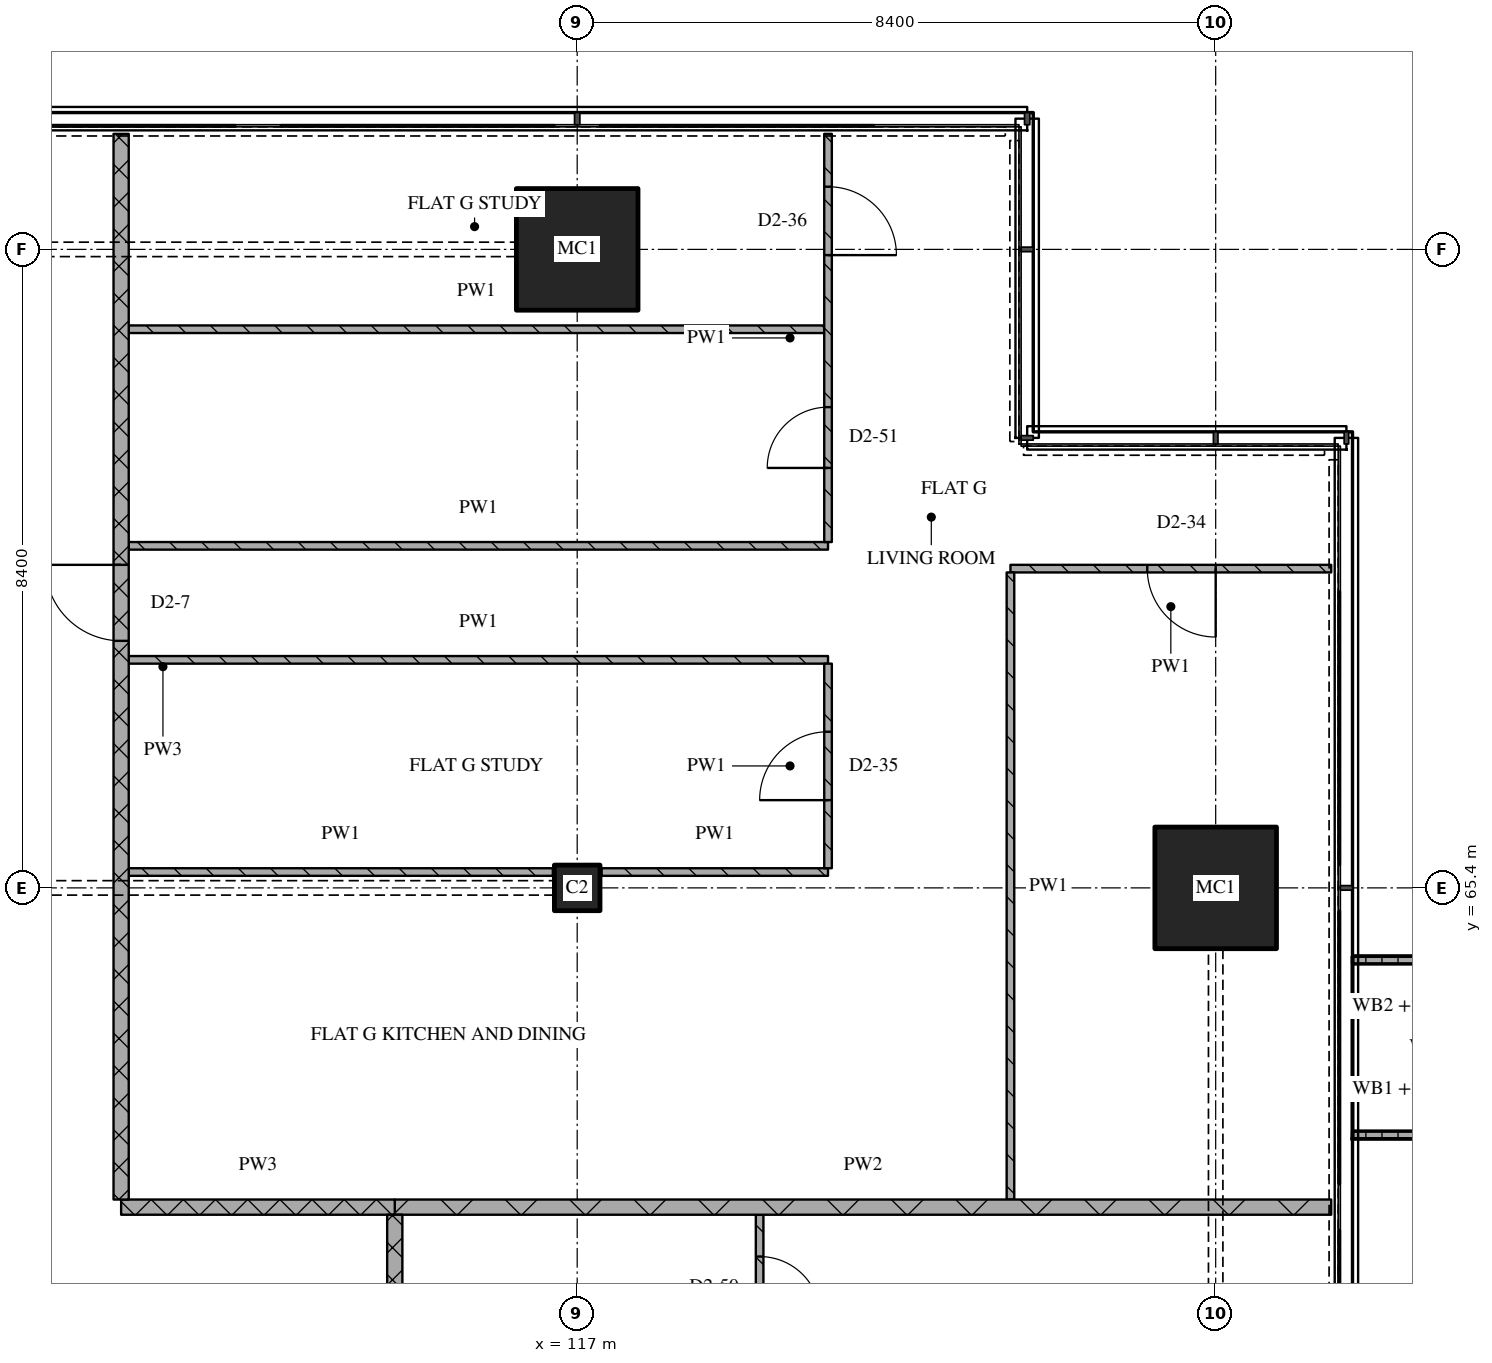
"""IFC4 building model, lengths in metres.
Left out: names, types, materials, properties, quantities, classifications, styles, units other than length and angle.
Written with IfcOpenShell. Run it as: python <this file> out.ifc"""

import sys

from ifc_helpers import new_model, si_unit, direction, frame, frame_2d, origin, origin_2d, place, context, subcontext, project, spatial, polyline, rectangle, outline, extrude, element, fill, save


model = new_model("IFC4")
c1 = context("Model", 3, precision=1e-05, world=origin(), true_north=direction((0.0, 1.0)))
c2 = subcontext(c1, "Body", "Model", "MODEL_VIEW")
j1 = project(units=[si_unit("LENGTHUNIT", "METRE"), si_unit("PLANEANGLEUNIT", "RADIAN")], contexts=[c1])
p1 = place(None, origin())
s1 = spatial("IfcSite", under=j1, at=p1, CompositionType="ELEMENT")
p2 = place(p1, origin())
s2 = spatial("IfcBuilding", under=s1, at=p2, CompositionType="ELEMENT")
p3 = place(p2, frame((0.0, 0.0, 216.3)))
s3 = spatial("IfcBuildingStorey", under=s2, at=p3, CompositionType="ELEMENT", Elevation=216.3)
p4 = place(p3, frame((117.0, 65.4, 0.0), z_axis=(0.0, 0.0, 1.0), x_axis=(1.0, 0.0, 0.0)))
e1 = element("IfcColumn", 1, at=p4, inside=s3, PredefinedType="COLUMN", context=c2, shape_type="SweptSolid", body=[
    extrude(rectangle(XDim=0.6, YDim=0.6, at=origin_2d()), origin(), (0.0, 0.0, 1.0), 3.6),
])
for number, where, z_axis, x_axis in (
    (2, (117.0, 73.8, 0.0), (0.0, 0.0, 1.0), (1.0, 0.0, 0.0)),
    (3, (125.4, 65.4, 0.0), (0.0, 0.0, 1.0), (1.0, 0.0, 0.0)),
):
    element("IfcColumn", number, at=place(p3, frame(where, z_axis=z_axis, x_axis=x_axis)), inside=s3, PredefinedType="COLUMN", context=c2, shape_type="SweptSolid", body=[
        extrude(rectangle(XDim=1.6, YDim=1.6, at=origin_2d()), origin(), (0.0, 0.0, 1.0), 3.6),
    ])
p5 = place(p3, origin())
e4 = element("IfcWall", 4, at=p5, inside=s3, PredefinedType="SOLIDWALL", context=c2, shape_type="SweptSolid", body=[
    extrude(outline(polyline([(127.2, 62.1), (127.2, 62.2), (128.7, 62.2), (128.7, 64.4), (127.2, 64.4), (127.2, 64.5), (128.8, 64.5), (128.8, 62.1), (127.2, 62.1)])), origin(), (0.0, 0.0, 1.0), 1.0),
])
p6 = place(p3, frame((111.0, 61.2, 0.0), z_axis=(0.0, 0.0, 1.0), x_axis=(1.0, 0.0, 0.0)))
e5 = element("IfcWall", 5, at=p6, inside=s3, PredefinedType="PARTITIONING", context=c2, shape_type="SweptSolid", body=[
    extrude(rectangle(XDim=3.6, YDim=0.2, at=frame_2d((1.8, 0.0))), origin(), (0.0, 0.0, 1.0), 3.32),
])
p7 = place(p3, frame((114.6, 61.2, 0.0), z_axis=(0.0, 0.0, 1.0), x_axis=(1.0, 0.0, 0.0)))
e6 = element("IfcWall", 6, at=p7, inside=s3, PredefinedType="PARTITIONING", context=c2, shape_type="SweptSolid", body=[
    extrude(rectangle(XDim=12.32, YDim=0.2, at=frame_2d((6.16, 0.0))), origin(), (0.0, 0.0, 1.0), 3.32),
])
p8 = place(p3, frame((111.1, 65.609, 0.0), z_axis=(0.0, 0.0, 1.0), x_axis=(1.0, 0.0, 0.0)))
e7 = element("IfcWall", 7, at=p8, inside=s3, PredefinedType="PARTITIONING", context=c2, shape_type="SweptSolid", body=[
    extrude(rectangle(XDim=5.58, YDim=0.1, at=frame_2d((2.79, 0.0))), origin(), (0.0, 0.0, 1.0), 3.32),
])
p9 = place(p3, frame((117.32, 65.609, 0.0), z_axis=(0.0, 0.0, 1.0), x_axis=(1.0, 0.0, 0.0)))
e8 = element("IfcWall", 8, at=p9, inside=s3, PredefinedType="PARTITIONING", context=c2, shape_type="SweptSolid", body=[
    extrude(rectangle(XDim=2.98, YDim=0.1, at=frame_2d((1.49, 0.0))), origin(), (0.0, 0.0, 1.0), 3.32),
])
p10 = place(p3, frame((111.1, 68.4, 0.0), z_axis=(0.0, 0.0, 1.0), x_axis=(1.0, 0.0, 0.0)))
e9 = element("IfcWall", 9, at=p10, inside=s3, PredefinedType="PARTITIONING", context=c2, shape_type="SweptSolid", body=[
    extrude(rectangle(XDim=9.2, YDim=0.1, at=frame_2d((4.6, 0.0))), origin(), (0.0, 0.0, 1.0), 3.32),
])
p11 = place(p3, frame((126.92, 69.6, 0.0), z_axis=(0.0, 0.0, 1.0), x_axis=(-1.0, 0.0, 0.0)))
e10 = element("IfcWall", 10, at=p11, inside=s3, PredefinedType="PARTITIONING", context=c2, shape_type="SweptSolid", body=[
    extrude(rectangle(XDim=4.22, YDim=0.1, at=frame_2d((2.11, 0.0))), origin(), (0.0, 0.0, 1.0), 3.32),
])
p12 = place(p11, frame((1.52, 0.0, 0.0)))
e11 = element("IfcOpeningElement", 11, at=p12, cuts=e10, PredefinedType="OPENING", context=c2, shape_type="SweptSolid", body=[
    extrude(rectangle(XDim=0.9, YDim=2.1, at=frame_2d((0.45, 1.05))), frame((0.0, 0.06, 0.0), z_axis=(0.0, -1.0, 0.0), x_axis=(1.0, 0.0, 0.0)), (0.0, 0.0, 1.0), 0.12),
])
p13 = place(p3, frame((111.1, 69.9, 0.0), z_axis=(0.0, 0.0, 1.0), x_axis=(1.0, 0.0, 0.0)))
e12 = element("IfcWall", 12, at=p13, inside=s3, PredefinedType="PARTITIONING", context=c2, shape_type="SweptSolid", body=[
    extrude(rectangle(XDim=9.2, YDim=0.1, at=frame_2d((4.6, 0.0))), origin(), (0.0, 0.0, 1.0), 3.32),
])
p14 = place(p3, frame((111.1, 72.75, 0.0), z_axis=(0.0, 0.0, 1.0), x_axis=(1.0, 0.0, 0.0)))
e13 = element("IfcWall", 13, at=p14, inside=s3, PredefinedType="PARTITIONING", context=c2, shape_type="SweptSolid", body=[
    extrude(rectangle(XDim=9.15, YDim=0.1, at=frame_2d((4.575, 0.0))), origin(), (0.0, 0.0, 1.0), 3.32),
])
p15 = place(p3, frame((111.0, 75.32, 0.0), z_axis=(0.0, 0.0, 1.0), x_axis=(0.0, -1.0, 0.0)))
e14 = element("IfcWall", 14, at=p15, inside=s3, PredefinedType="PARTITIONING", context=c2, shape_type="SweptSolid", body=[
    extrude(rectangle(XDim=14.02, YDim=0.2, at=frame_2d((7.01, 0.0))), origin(), (0.0, 0.0, 1.0), 3.32),
])
p16 = place(p15, frame((5.67, 0.0, 0.0)))
e15 = element("IfcOpeningElement", 15, at=p16, cuts=e14, PredefinedType="OPENING", context=c2, shape_type="SweptSolid", body=[
    extrude(rectangle(XDim=1.0, YDim=2.1, at=frame_2d((0.5, 1.05))), frame((0.0, 0.11, 0.0), z_axis=(0.0, -1.0, 0.0), x_axis=(1.0, 0.0, 0.0)), (0.0, 0.0, 1.0), 0.22),
])
p17 = place(p3, frame((114.6, 61.1, 0.0), z_axis=(0.0, 0.0, 1.0), x_axis=(0.0, -1.0, 0.0)))
e16 = element("IfcWall", 16, at=p17, inside=s3, PredefinedType="PARTITIONING", context=c2, shape_type="SweptSolid", body=[
    extrude(rectangle(XDim=17.8, YDim=0.2, at=frame_2d((8.9, 0.0))), origin(), (0.0, 0.0, 1.0), 3.32),
])
p18 = place(p3, frame((119.4, 54.65, 0.0), z_axis=(0.0, 0.0, 1.0), x_axis=(0.0, 1.0, 0.0)))
e17 = element("IfcWall", 17, at=p18, inside=s3, PredefinedType="PARTITIONING", context=c2, shape_type="SweptSolid", body=[
    extrude(rectangle(XDim=6.45, YDim=0.1, at=frame_2d((3.225, 0.0))), origin(), (0.0, 0.0, 1.0), 3.32),
])
p19 = place(p18, frame((1.8, 0.0, 0.0)))
e18 = element("IfcOpeningElement", 18, at=p19, cuts=e17, PredefinedType="OPENING", context=c2, shape_type="SweptSolid", body=[
    extrude(rectangle(XDim=0.8, YDim=2.1, at=frame_2d((0.4, 1.05))), frame((0.0, 0.06, 0.0), z_axis=(0.0, -1.0, 0.0), x_axis=(1.0, 0.0, 0.0)), (0.0, 0.0, 1.0), 0.12),
])
p20 = place(p18, frame((5.1, 0.0, 0.0)))
e19 = element("IfcOpeningElement", 19, at=p20, cuts=e17, PredefinedType="OPENING", context=c2, shape_type="SweptSolid", body=[
    extrude(rectangle(XDim=0.8, YDim=2.1, at=frame_2d((0.4, 1.05))), frame((0.0, 0.06, 0.0), z_axis=(0.0, -1.0, 0.0), x_axis=(1.0, 0.0, 0.0)), (0.0, 0.0, 1.0), 0.12),
])
p21 = place(p3, frame((120.3, 65.659, 0.0), z_axis=(0.0, 0.0, 1.0), x_axis=(0.0, 1.0, 0.0)))
e20 = element("IfcWall", 20, at=p21, inside=s3, PredefinedType="PARTITIONING", context=c2, shape_type="SweptSolid", body=[
    extrude(rectangle(XDim=2.691, YDim=0.1, at=frame_2d((1.346, 0.0))), origin(), (0.0, 0.0, 1.0), 3.32),
])
p22 = place(p21, frame((0.896, 0.0, 0.0)))
e21 = element("IfcOpeningElement", 21, at=p22, cuts=e20, PredefinedType="OPENING", context=c2, shape_type="SweptSolid", body=[
    extrude(rectangle(XDim=0.9, YDim=2.1, at=frame_2d((0.45, 1.05))), frame((0.0, 0.06, 0.0), z_axis=(0.0, -1.0, 0.0), x_axis=(1.0, 0.0, 0.0)), (0.0, 0.0, 1.0), 0.12),
])
p23 = place(p3, frame((120.3, 69.95, 0.0), z_axis=(0.0, 0.0, 1.0), x_axis=(0.0, 1.0, 0.0)))
e22 = element("IfcWall", 22, at=p23, inside=s3, PredefinedType="PARTITIONING", context=c2, shape_type="SweptSolid", body=[
    extrude(rectangle(XDim=5.37, YDim=0.1, at=frame_2d((2.685, 0.0))), origin(), (0.0, 0.0, 1.0), 3.32),
])
p24 = place(p23, frame((0.975, 0.0, 0.0)))
e23 = element("IfcOpeningElement", 23, at=p24, cuts=e22, PredefinedType="OPENING", context=c2, shape_type="SweptSolid", body=[
    extrude(rectangle(XDim=0.8, YDim=2.1, at=frame_2d((0.4, 1.05))), frame((0.0, 0.06, 0.0), z_axis=(0.0, -1.0, 0.0), x_axis=(1.0, 0.0, 0.0)), (0.0, 0.0, 1.0), 0.12),
])
p25 = place(p23, frame((3.775, 0.0, 0.0)))
e24 = element("IfcOpeningElement", 24, at=p25, cuts=e22, PredefinedType="OPENING", context=c2, shape_type="SweptSolid", body=[
    extrude(rectangle(XDim=0.9, YDim=2.1, at=frame_2d((0.45, 1.05))), frame((0.0, 0.06, 0.0), z_axis=(0.0, -1.0, 0.0), x_axis=(1.0, 0.0, 0.0)), (0.0, 0.0, 1.0), 0.12),
])
p26 = place(p3, frame((122.7, 69.55, 0.0), z_axis=(0.0, 0.0, 1.0), x_axis=(0.0, -1.0, 0.0)))
e25 = element("IfcWall", 25, at=p26, inside=s3, PredefinedType="PARTITIONING", context=c2, shape_type="SweptSolid", body=[
    extrude(rectangle(XDim=8.25, YDim=0.1, at=frame_2d((4.125, 0.0))), origin(), (0.0, 0.0, 1.0), 3.32),
])
p27 = place(p12, origin())
e26 = element("IfcDoor", 26, at=p27, inside=s3, OperationType="SINGLE_SWING_LEFT", PredefinedType="DOOR", context=c2, shape_type="SweptSolid", body=[
    extrude(rectangle(XDim=0.9, YDim=2.1, at=frame_2d((0.45, 1.05))), frame((0.0, 0.025, 0.0), z_axis=(0.0, -1.0, 0.0), x_axis=(1.0, 0.0, 0.0)), (0.0, 0.0, 1.0), 0.05),
])
fill(e11, e26)
p28 = place(p16, origin())
e27 = element("IfcDoor", 27, at=p28, inside=s3, OperationType="SINGLE_SWING_RIGHT", PredefinedType="DOOR", context=c2, shape_type="SweptSolid", body=[
    extrude(rectangle(XDim=1.0, YDim=2.1, at=frame_2d((0.5, 1.05))), frame((0.0, 0.025, 0.0), z_axis=(0.0, -1.0, 0.0), x_axis=(1.0, 0.0, 0.0)), (0.0, 0.0, 1.0), 0.05),
])
fill(e15, e27)
p29 = place(p20, origin())
e28 = element("IfcDoor", 28, at=p29, inside=s3, OperationType="SINGLE_SWING_RIGHT", PredefinedType="DOOR", context=c2, shape_type="SweptSolid", body=[
    extrude(rectangle(XDim=0.8, YDim=2.1, at=frame_2d((0.4, 1.05))), frame((0.0, 0.025, 0.0), z_axis=(0.0, -1.0, 0.0), x_axis=(1.0, 0.0, 0.0)), (0.0, 0.0, 1.0), 0.05),
])
fill(e19, e28)
p30 = place(p22, origin())
e29 = element("IfcDoor", 29, at=p30, inside=s3, OperationType="SINGLE_SWING_LEFT", PredefinedType="DOOR", context=c2, shape_type="SweptSolid", body=[
    extrude(rectangle(XDim=0.9, YDim=2.1, at=frame_2d((0.45, 1.05))), frame((0.0, 0.025, 0.0), z_axis=(0.0, -1.0, 0.0), x_axis=(1.0, 0.0, 0.0)), (0.0, 0.0, 1.0), 0.05),
])
fill(e21, e29)
p31 = place(p24, origin())
e30 = element("IfcDoor", 30, at=p31, inside=s3, OperationType="SINGLE_SWING_LEFT", PredefinedType="DOOR", context=c2, shape_type="SweptSolid", body=[
    extrude(rectangle(XDim=0.8, YDim=2.1, at=frame_2d((0.4, 1.05))), frame((0.0, 0.025, 0.0), z_axis=(0.0, -1.0, 0.0), x_axis=(1.0, 0.0, 0.0)), (0.0, 0.0, 1.0), 0.05),
])
fill(e23, e30)
p32 = place(p25, origin())
e31 = element("IfcDoor", 31, at=p32, inside=s3, OperationType="SINGLE_SWING_RIGHT", PredefinedType="DOOR", context=c2, shape_type="SweptSolid", body=[
    extrude(rectangle(XDim=0.9, YDim=2.1, at=frame_2d((0.45, 1.05))), frame((0.0, 0.025, 0.0), z_axis=(0.0, -1.0, 0.0), x_axis=(1.0, 0.0, 0.0)), (0.0, 0.0, 1.0), 0.05),
])
fill(e24, e31)
save(model, sys.argv[1])
